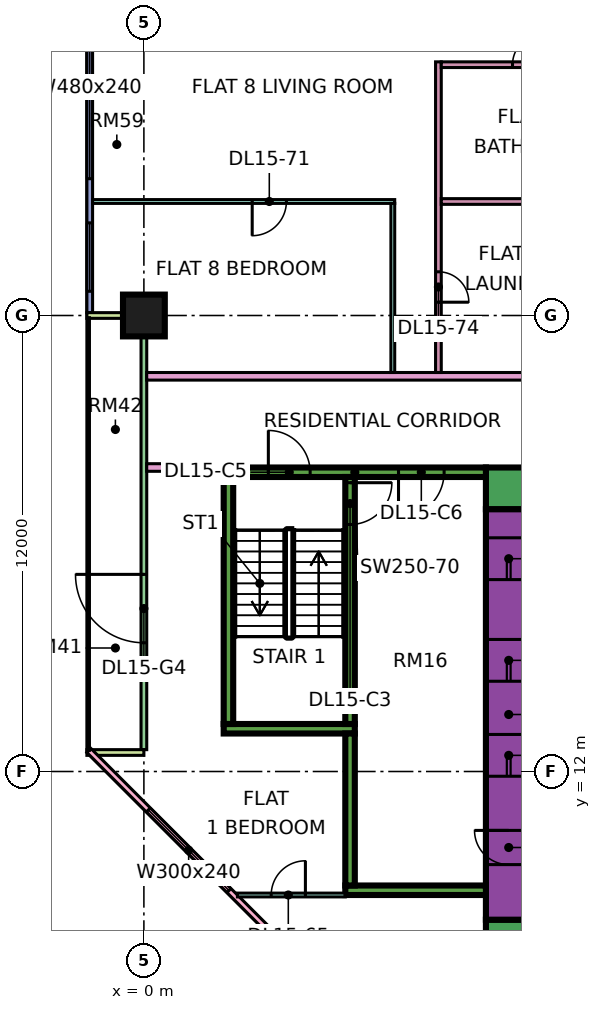
"""IFC4 building model, lengths in metres.
Left out: names, types, materials, properties, quantities, classifications, styles, units other than length and angle.
Written with IfcOpenShell. Run it as: python <this file> out.ifc"""

import sys

from ifc_helpers import new_model, si_unit, direction, frame, frame_2d, origin, origin_2d, place, context, subcontext, project, spatial, rectangle, extrude, element, fill, save


model = new_model("IFC4")
c1 = context("Model", 3, precision=1e-05, world=origin(), true_north=direction((0.0, 1.0)))
c2 = subcontext(c1, "Body", "Model", "MODEL_VIEW")
j1 = project(units=[si_unit("LENGTHUNIT", "METRE"), si_unit("PLANEANGLEUNIT", "RADIAN")], contexts=[c1])
p1 = place(None, origin())
s1 = spatial("IfcSite", under=j1, at=p1, CompositionType="ELEMENT")
p2 = place(p1, origin())
s2 = spatial("IfcBuilding", under=s1, at=p2, CompositionType="ELEMENT")
p3 = place(p2, frame((0.0, 0.0, 71.4)))
s3 = spatial("IfcBuildingStorey", under=s2, at=p3, CompositionType="ELEMENT", Elevation=71.4)
p4 = place(p3, frame((0.0, 24.0, 0.0), z_axis=(0.0, 0.0, 1.0), x_axis=(1.0, 0.0, 0.0)))
e1 = element("IfcColumn", 1, at=p4, inside=s3, PredefinedType="COLUMN", context=c2, shape_type="SweptSolid", body=[
    extrude(rectangle(XDim=1.1, YDim=1.1, at=origin_2d()), origin(), (0.0, 0.0, 1.0), 3.75),
])
p5 = place(p3, frame((9.0, 7.55, 0.0), z_axis=(0.0, 0.0, 1.0), x_axis=(1.0, 0.0, 0.0)))
e2 = element("IfcWall", 2, at=p5, inside=s3, PredefinedType="SHEAR", context=c2, shape_type="SweptSolid", body=[
    extrude(rectangle(XDim=25.0, YDim=1.1, at=frame_2d((12.5, 0.0))), origin(), (0.0, 0.0, 1.0), 3.75),
])
p6 = place(p3, frame((9.0, 19.45, 0.0), z_axis=(0.0, 0.0, 1.0), x_axis=(1.0, 0.0, 0.0)))
e3 = element("IfcWall", 3, at=p6, inside=s3, PredefinedType="SHEAR", context=c2, shape_type="SweptSolid", body=[
    extrude(rectangle(XDim=25.0, YDim=1.1, at=frame_2d((12.5, 0.0))), origin(), (0.0, 0.0, 1.0), 3.75),
])
p7 = place(p6, frame((19.1, 0.0, 0.0)))
e4 = element("IfcOpeningElement", 4, at=p7, cuts=e3, PredefinedType="OPENING", context=c2, shape_type="SweptSolid", body=[
    extrude(rectangle(XDim=1.8, YDim=2.4, at=frame_2d((0.9, 1.2))), frame((0.0, 0.56, 0.0), z_axis=(0.0, -1.0, 0.0), x_axis=(1.0, 0.0, 0.0)), (0.0, 0.0, 1.0), 1.12),
])
p8 = place(p3, frame((9.6, 8.1, 0.0), z_axis=(0.0, 0.0, 1.0), x_axis=(0.0, 1.0, 0.0)))
e5 = element("IfcWall", 5, at=p8, inside=s3, PredefinedType="SHEAR", context=c2, shape_type="SweptSolid", body=[
    extrude(rectangle(XDim=10.8, YDim=1.2, at=frame_2d((5.4, 0.0))), origin(), (0.0, 0.0, 1.0), 3.75),
])
p9 = place(p8, frame((3.775, 0.0, 0.0)))
e6 = element("IfcOpeningElement", 6, at=p9, cuts=e5, PredefinedType="OPENING", context=c2, shape_type="SweptSolid", body=[
    extrude(rectangle(XDim=1.1, YDim=2.2, at=frame_2d((0.55, 1.1))), frame((0.0, 0.61, 0.0), z_axis=(0.0, -1.0, 0.0), x_axis=(1.0, 0.0, 0.0)), (0.0, 0.0, 1.0), 1.22),
])
p10 = place(p8, frame((6.275, 0.0, 0.0)))
e7 = element("IfcOpeningElement", 7, at=p10, cuts=e5, PredefinedType="OPENING", context=c2, shape_type="SweptSolid", body=[
    extrude(rectangle(XDim=1.1, YDim=2.2, at=frame_2d((0.55, 1.1))), frame((0.0, 0.61, 0.0), z_axis=(0.0, -1.0, 0.0), x_axis=(1.0, 0.0, 0.0)), (0.0, 0.0, 1.0), 1.22),
])
p11 = place(p8, frame((8.95, 0.0, 0.0)))
e8 = element("IfcOpeningElement", 8, at=p11, cuts=e5, PredefinedType="OPENING", context=c2, shape_type="SweptSolid", body=[
    extrude(rectangle(XDim=1.1, YDim=2.2, at=frame_2d((0.55, 1.1))), frame((0.0, 0.61, 0.0), z_axis=(0.0, -1.0, 0.0), x_axis=(1.0, 0.0, 0.0)), (0.0, 0.0, 1.0), 1.22),
])
p12 = place(p8, frame((1.45, 0.0, 0.0)))
e9 = element("IfcOpeningElement", 9, at=p12, cuts=e5, PredefinedType="OPENING", context=c2, shape_type="SweptSolid", body=[
    extrude(rectangle(XDim=0.9, YDim=2.1, at=frame_2d((0.45, 1.05))), frame((0.0, 0.61, 0.0), z_axis=(0.0, -1.0, 0.0), x_axis=(1.0, 0.0, 0.0)), (0.0, 0.0, 1.0), 1.22),
])
p13 = place(p3, frame((2.1, 19.875, 0.0), z_axis=(0.0, 0.0, 1.0), x_axis=(1.0, 0.0, 0.0)))
e10 = element("IfcWall", 10, at=p13, inside=s3, PredefinedType="SHEAR", context=c2, shape_type="SweptSolid", body=[
    extrude(rectangle(XDim=6.9, YDim=0.25, at=frame_2d((3.45, 0.0))), origin(), (0.0, 0.0, 1.0), 3.75),
])
p14 = place(p13, frame((1.175, 0.0, 0.0)))
e11 = element("IfcOpeningElement", 11, at=p14, cuts=e10, PredefinedType="OPENING", context=c2, shape_type="SweptSolid", body=[
    extrude(rectangle(XDim=1.1, YDim=2.2, at=frame_2d((0.55, 1.1))), frame((0.0, 0.135, 0.0), z_axis=(0.0, -1.0, 0.0), x_axis=(1.0, 0.0, 0.0)), (0.0, 0.0, 1.0), 0.27),
])
p15 = place(p13, frame((4.6, 0.0, 0.0)))
e12 = element("IfcOpeningElement", 12, at=p15, cuts=e10, PredefinedType="OPENING", context=c2, shape_type="SweptSolid", body=[
    extrude(rectangle(XDim=1.2, YDim=2.2, at=frame_2d((0.6, 1.1))), frame((0.0, 0.135, 0.0), z_axis=(0.0, -1.0, 0.0), x_axis=(1.0, 0.0, 0.0)), (0.0, 0.0, 1.0), 0.27),
])
p16 = place(p3, frame((2.1, 13.125, 0.0), z_axis=(0.0, 0.0, 1.0), x_axis=(1.0, 0.0, 0.0)))
e13 = element("IfcWall", 13, at=p16, inside=s3, PredefinedType="SHEAR", context=c2, shape_type="SweptSolid", body=[
    extrude(rectangle(XDim=3.45, YDim=0.25, at=frame_2d((1.725, 0.0))), origin(), (0.0, 0.0, 1.0), 3.75),
])
p17 = place(p3, frame((2.225, 13.25, 0.0), z_axis=(0.0, 0.0, 1.0), x_axis=(0.0, 1.0, 0.0)))
e14 = element("IfcWall", 14, at=p17, inside=s3, PredefinedType="SHEAR", context=c2, shape_type="SweptSolid", body=[
    extrude(rectangle(XDim=6.5, YDim=0.25, at=frame_2d((3.25, 0.0))), origin(), (0.0, 0.0, 1.0), 3.75),
])
p18 = place(p3, frame((5.425, 13.25, 0.0), z_axis=(0.0, 0.0, 1.0), x_axis=(0.0, 1.0, 0.0)))
e15 = element("IfcWall", 15, at=p18, inside=s3, PredefinedType="SHEAR", context=c2, shape_type="SweptSolid", body=[
    extrude(rectangle(XDim=6.5, YDim=0.25, at=frame_2d((3.25, 0.0))), origin(), (0.0, 0.0, 1.0), 3.75),
])
p19 = place(p18, frame((5.25, 0.0, 0.0)))
e16 = element("IfcOpeningElement", 16, at=p19, cuts=e15, PredefinedType="OPENING", context=c2, shape_type="SweptSolid", body=[
    extrude(rectangle(XDim=1.1, YDim=2.2, at=frame_2d((0.55, 1.1))), frame((0.0, 0.135, 0.0), z_axis=(0.0, -1.0, 0.0), x_axis=(1.0, 0.0, 0.0)), (0.0, 0.0, 1.0), 0.27),
])
p20 = place(p3, frame((5.3, 8.875, 0.0), z_axis=(0.0, 0.0, 1.0), x_axis=(1.0, 0.0, 0.0)))
e17 = element("IfcWall", 17, at=p20, inside=s3, PredefinedType="SHEAR", context=c2, shape_type="SweptSolid", body=[
    extrude(rectangle(XDim=3.7, YDim=0.25, at=frame_2d((1.85, 0.0))), origin(), (0.0, 0.0, 1.0), 3.75),
])
p21 = place(p3, frame((5.425, 9.0, 0.0), z_axis=(0.0, 0.0, 1.0), x_axis=(0.0, 1.0, 0.0)))
e18 = element("IfcWall", 18, at=p21, inside=s3, PredefinedType="SHEAR", context=c2, shape_type="SweptSolid", body=[
    extrude(rectangle(XDim=4.0, YDim=0.25, at=frame_2d((2.0, 0.0))), origin(), (0.0, 0.0, 1.0), 3.75),
])
p22 = place(p3, frame((-1.425, 35.925, 0.0), z_axis=(0.0, 0.0, 1.0), x_axis=(0.0, -1.0, 0.0)))
e19 = element("IfcWall", 19, at=p22, inside=s3, PredefinedType="SOLIDWALL", context=c2, shape_type="SweptSolid", body=[
    extrude(rectangle(XDim=11.85, YDim=0.15, at=frame_2d((5.925, 0.0))), origin(), (0.0, 0.0, 1.0), 3.35),
])
p23 = place(p22, frame((0.562, 0.0, 0.45)))
e20 = element("IfcOpeningElement", 20, at=p23, cuts=e19, PredefinedType="OPENING", context=c2, shape_type="SweptSolid", body=[
    extrude(rectangle(XDim=1.8, YDim=2.4, at=frame_2d((0.9, 1.2))), frame((0.0, 0.085, 0.0), z_axis=(0.0, -1.0, 0.0), x_axis=(1.0, 0.0, 0.0)), (0.0, 0.0, 1.0), 0.17),
])
p24 = place(p22, frame((3.525, 0.0, 0.45)))
e21 = element("IfcOpeningElement", 21, at=p24, cuts=e19, PredefinedType="OPENING", context=c2, shape_type="SweptSolid", body=[
    extrude(rectangle(XDim=4.8, YDim=2.4, at=frame_2d((2.4, 1.2))), frame((0.0, 0.085, 0.0), z_axis=(0.0, -1.0, 0.0), x_axis=(1.0, 0.0, 0.0)), (0.0, 0.0, 1.0), 0.17),
])
p25 = place(p22, frame((9.488, 0.0, 0.45)))
e22 = element("IfcOpeningElement", 22, at=p25, cuts=e19, PredefinedType="OPENING", context=c2, shape_type="SweptSolid", body=[
    extrude(rectangle(XDim=1.8, YDim=2.4, at=frame_2d((0.9, 1.2))), frame((0.0, 0.085, 0.0), z_axis=(0.0, -1.0, 0.0), x_axis=(1.0, 0.0, 0.0)), (0.0, 0.0, 1.0), 0.17),
])
p26 = place(p3, frame((0.0, 23.925, 0.0), z_axis=(0.0, 0.0, 1.0), x_axis=(0.0, -1.0, 0.0)))
e23 = element("IfcWall", 23, at=p26, inside=s3, PredefinedType="SOLIDWALL", context=c2, shape_type="SweptSolid", body=[
    extrude(rectangle(XDim=11.35, YDim=0.15, at=frame_2d((5.675, 0.0))), origin(), (0.0, 0.0, 1.0), 3.35),
])
p27 = place(p26, frame((6.738, 0.0, 0.0)))
e24 = element("IfcOpeningElement", 24, at=p27, cuts=e23, PredefinedType="OPENING", context=c2, shape_type="SweptSolid", body=[
    extrude(rectangle(XDim=1.8, YDim=2.4, at=frame_2d((0.9, 1.2))), frame((0.0, 0.085, 0.0), z_axis=(0.0, -1.0, 0.0), x_axis=(1.0, 0.0, 0.0)), (0.0, 0.0, 1.0), 0.17),
])
for number, where, z_axis, x_axis in (
    (25, (-1.5, 24.0, 0.0), (0.0, 0.0, 1.0), (1.0, 0.0, 0.0)),
    (26, (-1.5, 12.5, 0.0), (0.0, 0.0, 1.0), (1.0, 0.0, 0.0)),
):
    element("IfcWall", number, at=place(p3, frame(where, z_axis=z_axis, x_axis=x_axis)), inside=s3, PredefinedType="SOLIDWALL", context=c2, shape_type="SweptSolid", body=[
        extrude(rectangle(XDim=1.5, YDim=0.15, at=frame_2d((0.75, 0.0))), origin(), (0.0, 0.0, 1.0), 3.35),
    ])
p28 = place(p3, frame((-1.447, 12.553, 0.0), z_axis=(0.0, 0.0, 1.0), x_axis=(0.707106781187, -0.707106781187, 0.0)))
e27 = element("IfcWall", 27, at=p28, inside=s3, PredefinedType="SOLIDWALL", context=c2, shape_type="SweptSolid", body=[
    extrude(rectangle(XDim=19.799, YDim=0.15, at=frame_2d((9.899, 0.0))), origin(), (0.0, 0.0, 1.0), 3.35),
])
p29 = place(p28, frame((2.212, 0.0, 0.45)))
e28 = element("IfcOpeningElement", 28, at=p29, cuts=e27, PredefinedType="OPENING", context=c2, shape_type="SweptSolid", body=[
    extrude(rectangle(XDim=3.0, YDim=2.4, at=frame_2d((1.5, 1.2))), frame((0.0, 0.085, 0.0), z_axis=(0.0, -1.0, 0.0), x_axis=(1.0, 0.0, 0.0)), (0.0, 0.0, 1.0), 0.17),
])
p30 = place(p28, frame((10.216, 0.0, 0.45)))
e29 = element("IfcOpeningElement", 29, at=p30, cuts=e27, PredefinedType="OPENING", context=c2, shape_type="SweptSolid", body=[
    extrude(rectangle(XDim=3.0, YDim=2.4, at=frame_2d((1.5, 1.2))), frame((0.0, 0.085, 0.0), z_axis=(0.0, -1.0, 0.0), x_axis=(1.0, 0.0, 0.0)), (0.0, 0.0, 1.0), 0.17),
])
p31 = place(p3, frame((-1.35, 27.0, 0.0), z_axis=(0.0, 0.0, 1.0), x_axis=(1.0, 0.0, 0.0)))
e30 = element("IfcWall", 30, at=p31, inside=s3, PredefinedType="PARTITIONING", context=c2, shape_type="SweptSolid", body=[
    extrude(rectangle(XDim=7.95, YDim=0.1, at=frame_2d((3.975, 0.0))), origin(), (0.0, 0.0, 1.0), 3.35),
])
p32 = place(p31, frame((4.2, 0.0, 0.0)))
e31 = element("IfcOpeningElement", 31, at=p32, cuts=e30, PredefinedType="OPENING", context=c2, shape_type="SweptSolid", body=[
    extrude(rectangle(XDim=0.9, YDim=2.1, at=frame_2d((0.45, 1.05))), frame((0.0, 0.06, 0.0), z_axis=(0.0, -1.0, 0.0), x_axis=(1.0, 0.0, 0.0)), (0.0, 0.0, 1.0), 0.12),
])
p33 = place(p3, frame((0.074, 20.0, 0.0), z_axis=(0.0, 0.0, 1.0), x_axis=(1.0, 0.0, 0.0)))
e32 = element("IfcWall", 32, at=p33, inside=s3, PredefinedType="PARTITIONING", context=c2, shape_type="SweptSolid", body=[
    extrude(rectangle(XDim=2.026, YDim=0.2, at=frame_2d((1.013, 0.0))), origin(), (0.0, 0.0, 1.0), 3.35),
])
p34 = place(p3, frame((0.074, 22.4, 0.0), z_axis=(0.0, 0.0, 1.0), x_axis=(1.0, 0.0, 0.0)))
e33 = element("IfcWall", 33, at=p34, inside=s3, PredefinedType="PARTITIONING", context=c2, shape_type="SweptSolid", body=[
    extrude(rectangle(XDim=12.376, YDim=0.2, at=frame_2d((6.188, 0.0))), origin(), (0.0, 0.0, 1.0), 3.35),
])
p35 = place(p3, frame((2.461, 8.75, 0.0), z_axis=(0.0, 0.0, 1.0), x_axis=(1.0, 0.0, 0.0)))
e34 = element("IfcWall", 34, at=p35, inside=s3, PredefinedType="PARTITIONING", context=c2, shape_type="SweptSolid", body=[
    extrude(rectangle(XDim=2.839, YDim=0.1, at=frame_2d((1.419, 0.0))), origin(), (0.0, 0.0, 1.0), 3.35),
])
p36 = place(p35, frame((0.889, 0.0, 0.0)))
e35 = element("IfcOpeningElement", 35, at=p36, cuts=e34, PredefinedType="OPENING", context=c2, shape_type="SweptSolid", body=[
    extrude(rectangle(XDim=0.9, YDim=2.1, at=frame_2d((0.45, 1.05))), frame((0.0, 0.06, 0.0), z_axis=(0.0, -1.0, 0.0), x_axis=(1.0, 0.0, 0.0)), (0.0, 0.0, 1.0), 0.12),
])
p37 = place(p3, frame((6.55, 22.5, 0.0), z_axis=(0.0, 0.0, 1.0), x_axis=(0.0, 1.0, 0.0)))
e36 = element("IfcWall", 36, at=p37, inside=s3, PredefinedType="PARTITIONING", context=c2, shape_type="SweptSolid", body=[
    extrude(rectangle(XDim=4.45, YDim=0.1, at=frame_2d((2.225, 0.0))), origin(), (0.0, 0.0, 1.0), 3.35),
])
p38 = place(p3, frame((7.75, 22.5, 0.0), z_axis=(0.0, 0.0, 1.0), x_axis=(0.0, 1.0, 0.0)))
e37 = element("IfcWall", 37, at=p38, inside=s3, PredefinedType="PARTITIONING", context=c2, shape_type="SweptSolid", body=[
    extrude(rectangle(XDim=8.175, YDim=0.15, at=frame_2d((4.087, 0.0))), origin(), (0.0, 0.0, 1.0), 3.35),
])
p39 = place(p38, frame((1.85, 0.0, 0.0)))
e38 = element("IfcOpeningElement", 38, at=p39, cuts=e37, PredefinedType="OPENING", context=c2, shape_type="SweptSolid", body=[
    extrude(rectangle(XDim=0.8, YDim=2.1, at=frame_2d((0.4, 1.05))), frame((0.0, 0.085, 0.0), z_axis=(0.0, -1.0, 0.0), x_axis=(1.0, 0.0, 0.0)), (0.0, 0.0, 1.0), 0.17),
])
p40 = place(p3, frame((7.825, 27.0, 0.0), z_axis=(0.0, 0.0, 1.0), x_axis=(1.0, 0.0, 0.0)))
e39 = element("IfcWall", 39, at=p40, inside=s3, PredefinedType="PARTITIONING", context=c2, shape_type="SweptSolid", body=[
    extrude(rectangle(XDim=4.625, YDim=0.15, at=frame_2d((2.312, 0.0))), origin(), (0.0, 0.0, 1.0), 3.35),
])
p41 = place(p3, frame((7.825, 30.6, 0.0), z_axis=(0.0, 0.0, 1.0), x_axis=(1.0, 0.0, 0.0)))
e40 = element("IfcWall", 40, at=p41, inside=s3, PredefinedType="PARTITIONING", context=c2, shape_type="SweptSolid", body=[
    extrude(rectangle(XDim=4.625, YDim=0.15, at=frame_2d((2.312, 0.0))), origin(), (0.0, 0.0, 1.0), 3.35),
])
p42 = place(p41, frame((1.875, 0.0, 0.0)))
e41 = element("IfcOpeningElement", 41, at=p42, cuts=e40, PredefinedType="OPENING", context=c2, shape_type="SweptSolid", body=[
    extrude(rectangle(XDim=0.8, YDim=2.1, at=frame_2d((0.4, 1.05))), frame((0.0, 0.085, 0.0), z_axis=(0.0, -1.0, 0.0), x_axis=(1.0, 0.0, 0.0)), (0.0, 0.0, 1.0), 0.17),
])
p43 = place(p24, origin())
e42 = element("IfcWindow", 42, at=p43, inside=s3, PartitioningType="SINGLE_PANEL", PredefinedType="WINDOW", context=c2, shape_type="SweptSolid", body=[
    extrude(rectangle(XDim=4.8, YDim=2.4, at=frame_2d((2.4, 1.2))), frame((0.0, 0.03, 0.0), z_axis=(0.0, -1.0, 0.0), x_axis=(1.0, 0.0, 0.0)), (0.0, 0.0, 1.0), 0.06),
])
fill(e21, e42)
p44 = place(p25, origin())
e43 = element("IfcWindow", 43, at=p44, inside=s3, PartitioningType="SINGLE_PANEL", PredefinedType="WINDOW", context=c2, shape_type="SweptSolid", body=[
    extrude(rectangle(XDim=1.8, YDim=2.4, at=frame_2d((0.9, 1.2))), frame((0.0, 0.03, 0.0), z_axis=(0.0, -1.0, 0.0), x_axis=(1.0, 0.0, 0.0)), (0.0, 0.0, 1.0), 0.06),
])
fill(e22, e43)
p45 = place(p27, frame((1.8, 0.0, 0.0), z_axis=(0.0, 0.0, 1.0), x_axis=(-1.0, 0.0, 0.0)))
e44 = element("IfcDoor", 44, at=p45, inside=s3, OperationType="DOUBLE_DOOR_SINGLE_SWING", PredefinedType="DOOR", context=c2, shape_type="SweptSolid", body=[
    extrude(rectangle(XDim=1.8, YDim=2.4, at=frame_2d((0.9, 1.2))), frame((0.0, 0.025, 0.0), z_axis=(0.0, -1.0, 0.0), x_axis=(1.0, 0.0, 0.0)), (0.0, 0.0, 1.0), 0.05),
])
fill(e24, e44)
p46 = place(p29, origin())
e45 = element("IfcWindow", 45, at=p46, inside=s3, PartitioningType="SINGLE_PANEL", PredefinedType="WINDOW", context=c2, shape_type="SweptSolid", body=[
    extrude(rectangle(XDim=3.0, YDim=2.4, at=frame_2d((1.5, 1.2))), frame((0.0, 0.03, 0.0), z_axis=(0.0, -1.0, 0.0), x_axis=(1.0, 0.0, 0.0)), (0.0, 0.0, 1.0), 0.06),
])
fill(e28, e45)
p47 = place(p9, origin())
e46 = element("IfcDoor", 46, at=p47, inside=s3, OperationType="DOUBLE_DOOR_SLIDING", PredefinedType="DOOR", context=c2, shape_type="SweptSolid", body=[
    extrude(rectangle(XDim=1.1, YDim=2.2, at=frame_2d((0.55, 1.1))), frame((0.0, 0.025, 0.0), z_axis=(0.0, -1.0, 0.0), x_axis=(1.0, 0.0, 0.0)), (0.0, 0.0, 1.0), 0.05),
])
fill(e6, e46)
p48 = place(p10, origin())
e47 = element("IfcDoor", 47, at=p48, inside=s3, OperationType="DOUBLE_DOOR_SLIDING", PredefinedType="DOOR", context=c2, shape_type="SweptSolid", body=[
    extrude(rectangle(XDim=1.1, YDim=2.2, at=frame_2d((0.55, 1.1))), frame((0.0, 0.025, 0.0), z_axis=(0.0, -1.0, 0.0), x_axis=(1.0, 0.0, 0.0)), (0.0, 0.0, 1.0), 0.05),
])
fill(e7, e47)
p49 = place(p11, origin())
e48 = element("IfcDoor", 48, at=p49, inside=s3, OperationType="DOUBLE_DOOR_SLIDING", PredefinedType="DOOR", context=c2, shape_type="SweptSolid", body=[
    extrude(rectangle(XDim=1.1, YDim=2.2, at=frame_2d((0.55, 1.1))), frame((0.0, 0.025, 0.0), z_axis=(0.0, -1.0, 0.0), x_axis=(1.0, 0.0, 0.0)), (0.0, 0.0, 1.0), 0.05),
])
fill(e8, e48)
p50 = place(p19, origin())
e49 = element("IfcDoor", 49, at=p50, inside=s3, OperationType="SINGLE_SWING_RIGHT", PredefinedType="DOOR", context=c2, shape_type="SweptSolid", body=[
    extrude(rectangle(XDim=1.1, YDim=2.2, at=frame_2d((0.55, 1.1))), frame((0.0, 0.025, 0.0), z_axis=(0.0, -1.0, 0.0), x_axis=(1.0, 0.0, 0.0)), (0.0, 0.0, 1.0), 0.05),
])
fill(e16, e49)
p51 = place(p12, frame((0.9, 0.0, 0.0), z_axis=(0.0, 0.0, 1.0), x_axis=(-1.0, 0.0, 0.0)))
e50 = element("IfcDoor", 50, at=p51, inside=s3, OperationType="SINGLE_SWING_RIGHT", PredefinedType="DOOR", context=c2, shape_type="SweptSolid", body=[
    extrude(rectangle(XDim=0.9, YDim=2.1, at=frame_2d((0.45, 1.05))), frame((0.0, 0.025, 0.0), z_axis=(0.0, -1.0, 0.0), x_axis=(1.0, 0.0, 0.0)), (0.0, 0.0, 1.0), 0.05),
])
fill(e9, e50)
p52 = place(p14, origin())
e51 = element("IfcDoor", 51, at=p52, inside=s3, OperationType="SINGLE_SWING_LEFT", PredefinedType="DOOR", context=c2, shape_type="SweptSolid", body=[
    extrude(rectangle(XDim=1.1, YDim=2.2, at=frame_2d((0.55, 1.1))), frame((0.0, 0.025, 0.0), z_axis=(0.0, -1.0, 0.0), x_axis=(1.0, 0.0, 0.0)), (0.0, 0.0, 1.0), 0.05),
])
fill(e11, e51)
p53 = place(p15, frame((1.2, 0.0, 0.0), z_axis=(0.0, 0.0, 1.0), x_axis=(-1.0, 0.0, 0.0)))
e52 = element("IfcDoor", 52, at=p53, inside=s3, OperationType="SINGLE_SWING_LEFT", PredefinedType="DOOR", context=c2, shape_type="SweptSolid", body=[
    extrude(rectangle(XDim=1.2, YDim=2.2, at=frame_2d((0.6, 1.1))), frame((0.0, 0.025, 0.0), z_axis=(0.0, -1.0, 0.0), x_axis=(1.0, 0.0, 0.0)), (0.0, 0.0, 1.0), 0.05),
])
fill(e12, e52)
p54 = place(p36, frame((0.9, 0.0, 0.0), z_axis=(0.0, 0.0, 1.0), x_axis=(-1.0, 0.0, 0.0)))
e53 = element("IfcDoor", 53, at=p54, inside=s3, OperationType="SINGLE_SWING_RIGHT", PredefinedType="DOOR", context=c2, shape_type="SweptSolid", body=[
    extrude(rectangle(XDim=0.9, YDim=2.1, at=frame_2d((0.45, 1.05))), frame((0.0, 0.025, 0.0), z_axis=(0.0, -1.0, 0.0), x_axis=(1.0, 0.0, 0.0)), (0.0, 0.0, 1.0), 0.05),
])
fill(e35, e53)
p55 = place(p42, frame((0.8, 0.0, 0.0), z_axis=(0.0, 0.0, 1.0), x_axis=(-1.0, 0.0, 0.0)))
e54 = element("IfcDoor", 54, at=p55, inside=s3, OperationType="SINGLE_SWING_RIGHT", PredefinedType="DOOR", context=c2, shape_type="SweptSolid", body=[
    extrude(rectangle(XDim=0.8, YDim=2.1, at=frame_2d((0.4, 1.05))), frame((0.0, 0.025, 0.0), z_axis=(0.0, -1.0, 0.0), x_axis=(1.0, 0.0, 0.0)), (0.0, 0.0, 1.0), 0.05),
])
fill(e41, e54)
p56 = place(p32, frame((0.9, 0.0, 0.0), z_axis=(0.0, 0.0, 1.0), x_axis=(-1.0, 0.0, 0.0)))
e55 = element("IfcDoor", 55, at=p56, inside=s3, OperationType="SINGLE_SWING_LEFT", PredefinedType="DOOR", context=c2, shape_type="SweptSolid", body=[
    extrude(rectangle(XDim=0.9, YDim=2.1, at=frame_2d((0.45, 1.05))), frame((0.0, 0.025, 0.0), z_axis=(0.0, -1.0, 0.0), x_axis=(1.0, 0.0, 0.0)), (0.0, 0.0, 1.0), 0.05),
])
fill(e31, e55)
p57 = place(p39, frame((0.8, 0.0, 0.0), z_axis=(0.0, 0.0, 1.0), x_axis=(-1.0, 0.0, 0.0)))
e56 = element("IfcDoor", 56, at=p57, inside=s3, OperationType="SINGLE_SWING_LEFT", PredefinedType="DOOR", context=c2, shape_type="SweptSolid", body=[
    extrude(rectangle(XDim=0.8, YDim=2.1, at=frame_2d((0.4, 1.05))), frame((0.0, 0.025, 0.0), z_axis=(0.0, -1.0, 0.0), x_axis=(1.0, 0.0, 0.0)), (0.0, 0.0, 1.0), 0.05),
])
fill(e38, e56)
save(model, sys.argv[1])
